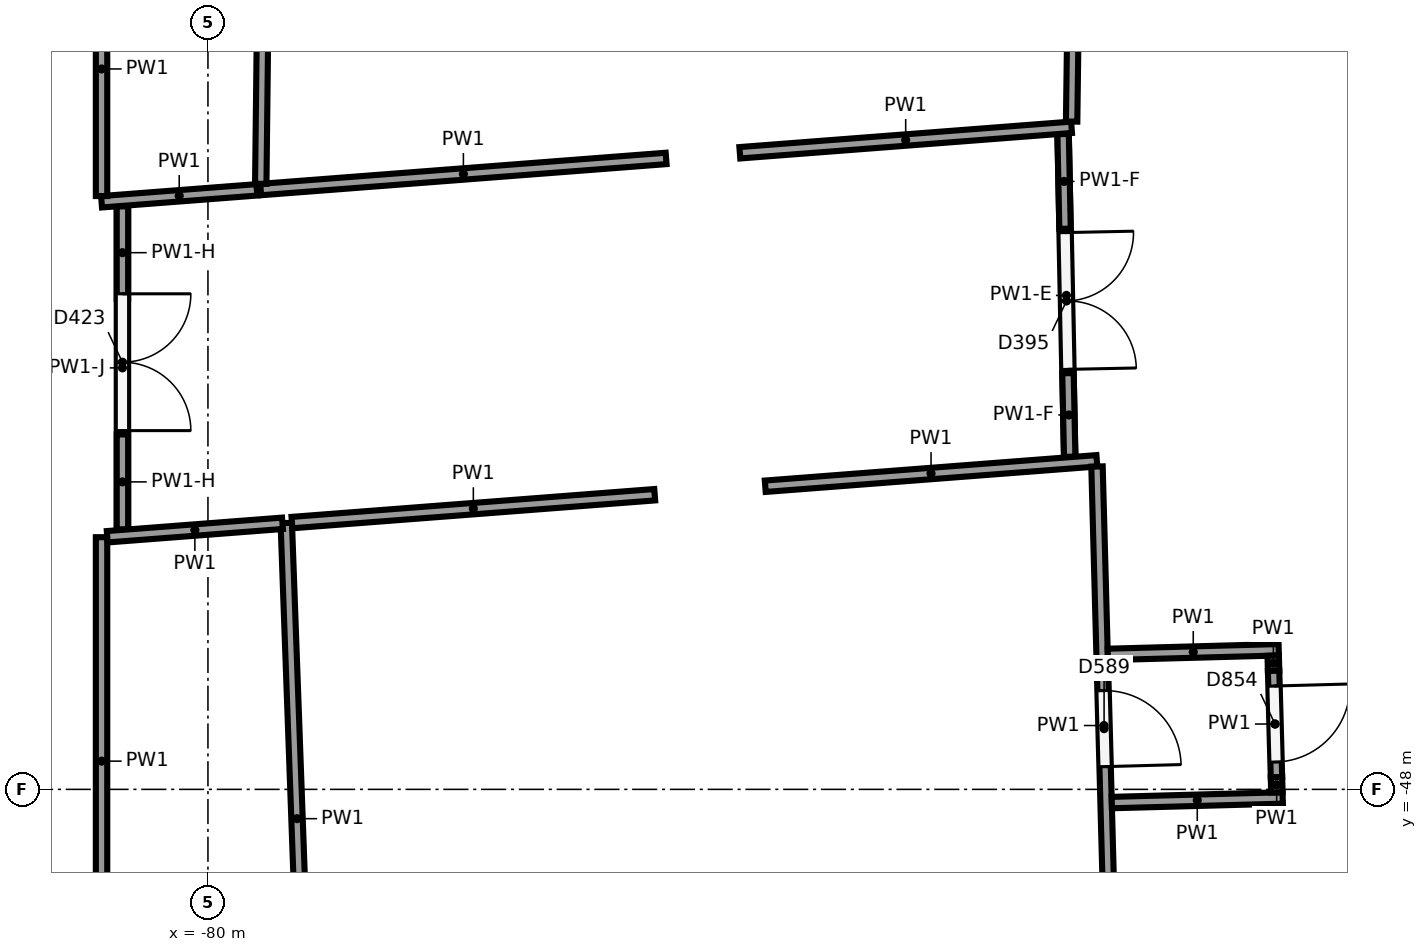
"""IFC4 building model, lengths in metres.
Left out: names, types, materials, properties, quantities, classifications, styles, units other than length and angle.
Written with IfcOpenShell. Run it as: python <this file> out.ifc"""

import sys

from ifc_helpers import new_model, si_unit, direction, frame, frame_2d, origin, origin_2d, place, context, subcontext, project, spatial, rectangle, circle, extrude, element, fill, save


model = new_model("IFC4")
c1 = context("Model", 3, precision=1e-05, world=origin(), true_north=direction((0.0, 1.0)))
c2 = subcontext(c1, "Body", "Model", "MODEL_VIEW")
j1 = project(units=[si_unit("LENGTHUNIT", "METRE"), si_unit("PLANEANGLEUNIT", "RADIAN")], contexts=[c1])
p1 = place(None, origin())
s1 = spatial("IfcSite", under=j1, at=p1, CompositionType="ELEMENT")
p2 = place(p1, origin())
s2 = spatial("IfcBuilding", under=s1, at=p2, CompositionType="ELEMENT")
p3 = place(p2, origin())
s3 = spatial("IfcBuildingStorey", under=s2, at=p3, CompositionType="ELEMENT", Elevation=0.0)
p4 = place(p3, frame((-64.83, -41.204, 0.0), z_axis=(0.0, 0.0, 1.0), x_axis=(1.0, 0.0, 0.0)))
e1 = element("IfcColumn", 1, at=p4, inside=s3, PredefinedType="COLUMN", context=c2, shape_type="SweptSolid", body=[
    extrude(circle(Radius=0.4, at=origin_2d()), origin(), (0.0, 0.0, 1.0), 6.5),
])
p5 = place(p3, frame((-73.405, -41.862, 0.0), z_axis=(0.0, 0.0, 1.0), x_axis=(1.0, 0.0, 0.0)))
e2 = element("IfcColumn", 2, at=p5, inside=s3, PredefinedType="COLUMN", context=c2, shape_type="SweptSolid", body=[
    extrude(circle(Radius=0.45, at=origin_2d()), origin(), (0.0, 0.0, 1.0), 6.5),
])
p6 = place(p3, frame((-68.638, -39.29, 0.0), z_axis=(0.0, 0.0, 1.0), x_axis=(-0.997067594877, -0.076525886114, 0.0)))
e3 = element("IfcWall", 3, at=p6, inside=s3, PredefinedType="PARTITIONING", context=c2, shape_type="SweptSolid", body=[
    extrude(rectangle(XDim=4.377, YDim=0.15, at=frame_2d((2.188, 0.0))), origin(), (0.0, 0.0, 1.0), 6.15),
])
p7 = place(p3, frame((-73.972, -39.699, 0.0), z_axis=(0.0, 0.0, 1.0), x_axis=(-0.997067356456, -0.076528992484, 0.0)))
e4 = element("IfcWall", 4, at=p7, inside=s3, PredefinedType="PARTITIONING", context=c2, shape_type="SweptSolid", body=[
    extrude(rectangle(XDim=5.35, YDim=0.15, at=frame_2d((2.675, 0.0))), origin(), (0.0, 0.0, 1.0), 6.15),
])
p8 = place(p3, frame((-79.305, -40.033, 0.0), z_axis=(0.0, 0.0, 1.0), x_axis=(0.011498912263, 0.999933885323, 0.0)))
e5 = element("IfcWall", 5, at=p8, inside=s3, PredefinedType="PARTITIONING", context=c2, shape_type="SweptSolid", body=[
    extrude(rectangle(XDim=9.321, YDim=0.15, at=frame_2d((4.66, 0.0))), origin(), (0.0, 0.0, 1.0), 6.15),
])
p9 = place(p3, frame((-68.515, -30.116, 0.0), z_axis=(0.0, 0.0, 1.0), x_axis=(-0.013361477522, -0.999910731475, 0.0)))
e6 = element("IfcWall", 6, at=p9, inside=s3, PredefinedType="PARTITIONING", context=c2, shape_type="SweptSolid", body=[
    extrude(rectangle(XDim=9.099, YDim=0.15, at=frame_2d((4.55, 0.0))), origin(), (0.0, 0.0, 1.0), 6.15),
])
p10 = place(p3, frame((-79.356, -40.113, 0.0), z_axis=(0.0, 0.0, 1.0), x_axis=(-0.997072672084, -0.076459705623, 0.0)))
e7 = element("IfcWall", 7, at=p10, inside=s3, PredefinedType="PARTITIONING", context=c2, shape_type="SweptSolid", body=[
    extrude(rectangle(XDim=2.05, YDim=0.15, at=frame_2d((1.025, 0.0))), origin(), (0.0, 0.0, 1.0), 6.15),
])
p11 = place(p3, frame((-81.4, -40.194, 0.0), z_axis=(0.0, 0.0, 1.0), x_axis=(0.0, 1.0, 0.0)))
e8 = element("IfcWall", 8, at=p11, inside=s3, PredefinedType="PARTITIONING", context=c2, shape_type="SweptSolid", body=[
    extrude(rectangle(XDim=3.344, YDim=0.15, at=frame_2d((1.672, 0.0))), origin(), (0.0, 0.0, 1.0), 6.15),
])
p12 = place(p3, frame((-78.687, -52.275, 0.0), z_axis=(0.0, 0.0, 1.0), x_axis=(-0.036317977956, 0.999340284626, 0.0)))
e9 = element("IfcWall", 9, at=p12, inside=s3, PredefinedType="PARTITIONING", context=c2, shape_type="SweptSolid", body=[
    extrude(rectangle(XDim=7.784, YDim=0.15, at=frame_2d((3.892, 0.0))), origin(), (0.0, 0.0, 1.0), 6.15),
])
p13 = place(p3, frame((-78.895, -44.49, 0.0), z_axis=(0.0, 0.0, 1.0), x_axis=(0.99706916822, 0.076505384026, 0.0)))
e10 = element("IfcWall", 10, at=p13, inside=s3, PredefinedType="PARTITIONING", context=c2, shape_type="SweptSolid", body=[
    extrude(rectangle(XDim=4.787, YDim=0.15, at=frame_2d((2.393, 0.0))), origin(), (0.0, 0.0, 1.0), 6.15),
])
p14 = place(p3, frame((-72.667, -44.012, 0.0), z_axis=(0.0, 0.0, 1.0), x_axis=(0.997065634049, 0.076551429766, 0.0)))
e11 = element("IfcWall", 11, at=p14, inside=s3, PredefinedType="PARTITIONING", context=c2, shape_type="SweptSolid", body=[
    extrude(rectangle(XDim=4.376, YDim=0.15, at=frame_2d((2.188, 0.0))), origin(), (0.0, 0.0, 1.0), 6.15),
])
p15 = place(p3, frame((-68.302, -43.752, 0.0), z_axis=(0.0, 0.0, 1.0), x_axis=(0.026998787176, -0.999635466303, 0.0)))
e12 = element("IfcWall", 12, at=p15, inside=s3, PredefinedType="PARTITIONING", context=c2, shape_type="SweptSolid", body=[
    extrude(rectangle(XDim=6.818, YDim=0.15, at=frame_2d((3.409, 0.0))), origin(), (0.0, 0.0, 1.0), 6.15),
])
p16 = place(p15, frame((2.95, 0.0, 0.0)))
e13 = element("IfcOpeningElement", 13, at=p16, cuts=e12, PredefinedType="OPENING", context=c2, shape_type="SweptSolid", body=[
    extrude(rectangle(XDim=1.0, YDim=2.1, at=frame_2d((0.5, 1.05))), frame((0.0, 0.085, 0.0), z_axis=(0.0, -1.0, 0.0), x_axis=(1.0, 0.0, 0.0)), (0.0, 0.0, 1.0), 0.17),
])
p17 = place(p3, frame((-81.4, -50.575, 0.0), z_axis=(0.0, 0.0, 1.0), x_axis=(0.0, 1.0, 0.0)))
e14 = element("IfcWall", 14, at=p17, inside=s3, PredefinedType="PARTITIONING", context=c2, shape_type="SweptSolid", body=[
    extrude(rectangle(XDim=5.893, YDim=0.15, at=frame_2d((2.946, 0.0))), origin(), (0.0, 0.0, 1.0), 6.15),
])
p18 = place(p3, frame((-81.325, -44.677, 0.0), z_axis=(0.0, 0.0, 1.0), x_axis=(0.997066273449, 0.076543101255, 0.0)))
e15 = element("IfcWall", 15, at=p18, inside=s3, PredefinedType="PARTITIONING", context=c2, shape_type="SweptSolid", body=[
    extrude(rectangle(XDim=2.312, YDim=0.15, at=frame_2d((1.156, 0.0))), origin(), (0.0, 0.0, 1.0), 6.15),
])
for number, where, z_axis, x_axis in (
    (16, (-68.161, -46.224, 0.0), (0.0, 0.0, 1.0), (1.0, 0.027, 0.0)),
    (17, (-68.108, -48.174, 0.0), (0.0, 0.0, 1.0), (1.0, 0.027, 0.0)),
):
    element("IfcWall", number, at=place(p3, frame(where, z_axis=z_axis, x_axis=x_axis)), inside=s3, PredefinedType="PARTITIONING", context=c2, shape_type="SweptSolid", body=[
        extrude(rectangle(XDim=2.25, YDim=0.15, at=frame_2d((1.125, 0.0))), origin(), (0.0, 0.0, 1.0), 6.15),
    ])
p19 = place(p3, frame((-65.985, -46.24, 0.0), z_axis=(0.0, 0.0, 1.0), x_axis=(0.026852340708, -0.999639410887, 0.0)))
e18 = element("IfcWall", 18, at=p19, inside=s3, PredefinedType="PARTITIONING", context=c2, shape_type="SweptSolid", body=[
    extrude(rectangle(XDim=0.2, YDim=0.15, at=frame_2d((0.1, 0.0))), origin(), (0.0, 0.0, 1.0), 6.15),
])
p20 = place(p3, frame((-65.979, -46.44, 0.0), z_axis=(0.0, 0.0, 1.0), x_axis=(0.027026579604, -0.999634715281, 0.0)))
e19 = element("IfcWall", 19, at=p20, inside=s3, PredefinedType="PARTITIONING", context=c2, shape_type="SweptSolid", body=[
    extrude(rectangle(XDim=1.4, YDim=0.15, at=frame_2d((0.7, 0.0))), origin(), (0.0, 0.0, 1.0), 6.15),
])
p21 = place(p20, frame((0.2, 0.0, 0.0)))
e20 = element("IfcOpeningElement", 20, at=p21, cuts=e19, PredefinedType="OPENING", context=c2, shape_type="SweptSolid", body=[
    extrude(rectangle(XDim=1.0, YDim=2.1, at=frame_2d((0.5, 1.05))), frame((0.0, 0.085, 0.0), z_axis=(0.0, -1.0, 0.0), x_axis=(1.0, 0.0, 0.0)), (0.0, 0.0, 1.0), 0.17),
])
p22 = place(p3, frame((-65.941, -47.84, 0.0), z_axis=(0.0, 0.0, 1.0), x_axis=(0.026852340708, -0.999639410887, 0.0)))
e21 = element("IfcWall", 21, at=p22, inside=s3, PredefinedType="PARTITIONING", context=c2, shape_type="SweptSolid", body=[
    extrude(rectangle(XDim=0.2, YDim=0.15, at=frame_2d((0.1, 0.0))), origin(), (0.0, 0.0, 1.0), 6.15),
])
p23 = place(p3, frame((-81.125, -40.33, 0.0), z_axis=(0.0, 0.0, 1.0), x_axis=(0.0, -1.0, 0.0)))
e22 = element("IfcWall", 22, at=p23, inside=s3, PredefinedType="PARTITIONING", context=c2, shape_type="SweptSolid", body=[
    extrude(rectangle(XDim=4.249, YDim=0.15, at=frame_2d((2.125, 0.0))), origin(), (0.0, 0.0, 1.0), 5.05),
])
p24 = place(p23, frame((1.15, 0.0, 0.0)))
e23 = element("IfcOpeningElement", 23, at=p24, cuts=e22, PredefinedType="OPENING", context=c2, shape_type="SweptSolid", body=[
    extrude(rectangle(XDim=1.8, YDim=2.1, at=frame_2d((0.9, 1.05))), frame((0.0, 0.085, 0.0), z_axis=(0.0, -1.0, 0.0), x_axis=(1.0, 0.0, 0.0)), (0.0, 0.0, 1.0), 0.17),
])
p25 = place(p3, frame((-81.125, -40.33, 5.05), z_axis=(0.0, 0.0, 1.0), x_axis=(0.0, -1.0, 0.0)))
e24 = element("IfcWall", 24, at=p25, inside=s3, PredefinedType="PARTITIONING", context=c2, shape_type="SweptSolid", body=[
    extrude(rectangle(XDim=1.218, YDim=0.15, at=frame_2d((0.609, 0.0))), origin(), (0.0, 0.0, 1.0), 1.1),
])
p26 = place(p3, frame((-81.125, -43.33, 5.05), z_axis=(0.0, 0.0, 1.0), x_axis=(0.0, -1.0, 0.0)))
e25 = element("IfcWall", 25, at=p26, inside=s3, PredefinedType="PARTITIONING", context=c2, shape_type="SweptSolid", body=[
    extrude(rectangle(XDim=1.249, YDim=0.15, at=frame_2d((0.625, 0.0))), origin(), (0.0, 0.0, 1.0), 1.1),
])
p27 = place(p3, frame((-68.749, -39.379, 0.0), z_axis=(0.0, 0.0, 1.0), x_axis=(0.020353480226, -0.999792846465, 0.0)))
e26 = element("IfcWall", 26, at=p27, inside=s3, PredefinedType="PARTITIONING", context=c2, shape_type="SweptSolid", body=[
    extrude(rectangle(XDim=4.246, YDim=0.15, at=frame_2d((2.123, 0.0))), origin(), (0.0, 0.0, 1.0), 5.25),
])
p28 = place(p27, frame((1.296, 0.0, 0.0)))
e27 = element("IfcOpeningElement", 27, at=p28, cuts=e26, PredefinedType="OPENING", context=c2, shape_type="SweptSolid", body=[
    extrude(rectangle(XDim=1.8, YDim=2.1, at=frame_2d((0.9, 1.05))), frame((0.0, 0.085, 0.0), z_axis=(0.0, -1.0, 0.0), x_axis=(1.0, 0.0, 0.0)), (0.0, 0.0, 1.0), 0.17),
])
p29 = place(p3, frame((-68.685, -42.524, 5.25), z_axis=(0.0, 0.0, 1.0), x_axis=(0.020417496513, -0.999791541191, 0.0)))
e28 = element("IfcWall", 28, at=p29, inside=s3, PredefinedType="PARTITIONING", context=c2, shape_type="SweptSolid", body=[
    extrude(rectangle(XDim=1.1, YDim=0.15, at=frame_2d((0.55, 0.0))), origin(), (0.0, 0.0, 1.0), 0.9),
])
p30 = place(p3, frame((-68.749, -39.379, 5.25), z_axis=(0.0, 0.0, 1.0), x_axis=(0.020375937382, -0.999792389037, 0.0)))
e29 = element("IfcWall", 29, at=p30, inside=s3, PredefinedType="PARTITIONING", context=c2, shape_type="SweptSolid", body=[
    extrude(rectangle(XDim=1.246, YDim=0.15, at=frame_2d((0.623, 0.0))), origin(), (0.0, 0.0, 1.0), 0.9),
])
p31 = place(p16, origin())
e30 = element("IfcDoor", 30, at=p31, inside=s3, OperationType="SINGLE_SWING_RIGHT", PredefinedType="DOOR", context=c2, shape_type="SweptSolid", body=[
    extrude(rectangle(XDim=1.0, YDim=2.1, at=frame_2d((0.5, 1.05))), frame((0.0, 0.025, 0.0), z_axis=(0.0, -1.0, 0.0), x_axis=(1.0, 0.0, 0.0)), (0.0, 0.0, 1.0), 0.05),
])
fill(e13, e30)
p32 = place(p21, origin())
e31 = element("IfcDoor", 31, at=p32, inside=s3, OperationType="SINGLE_SWING_LEFT", PredefinedType="DOOR", context=c2, shape_type="SweptSolid", body=[
    extrude(rectangle(XDim=1.0, YDim=2.1, at=frame_2d((0.5, 1.05))), frame((0.0, 0.025, 0.0), z_axis=(0.0, -1.0, 0.0), x_axis=(1.0, 0.0, 0.0)), (0.0, 0.0, 1.0), 0.05),
])
fill(e20, e31)
p33 = place(p24, origin())
e32 = element("IfcDoor", 32, at=p33, inside=s3, OperationType="DOUBLE_DOOR_SINGLE_SWING", PredefinedType="DOOR", context=c2, shape_type="SweptSolid", body=[
    extrude(rectangle(XDim=1.8, YDim=2.1, at=frame_2d((0.9, 1.05))), frame((0.0, 0.025, 0.0), z_axis=(0.0, -1.0, 0.0), x_axis=(1.0, 0.0, 0.0)), (0.0, 0.0, 1.0), 0.05),
])
fill(e23, e32)
p34 = place(p28, origin())
e33 = element("IfcDoor", 33, at=p34, inside=s3, OperationType="DOUBLE_DOOR_SINGLE_SWING", PredefinedType="DOOR", context=c2, shape_type="SweptSolid", body=[
    extrude(rectangle(XDim=1.8, YDim=2.1, at=frame_2d((0.9, 1.05))), frame((0.0, 0.025, 0.0), z_axis=(0.0, -1.0, 0.0), x_axis=(1.0, 0.0, 0.0)), (0.0, 0.0, 1.0), 0.05),
])
fill(e27, e33)
save(model, sys.argv[1])
